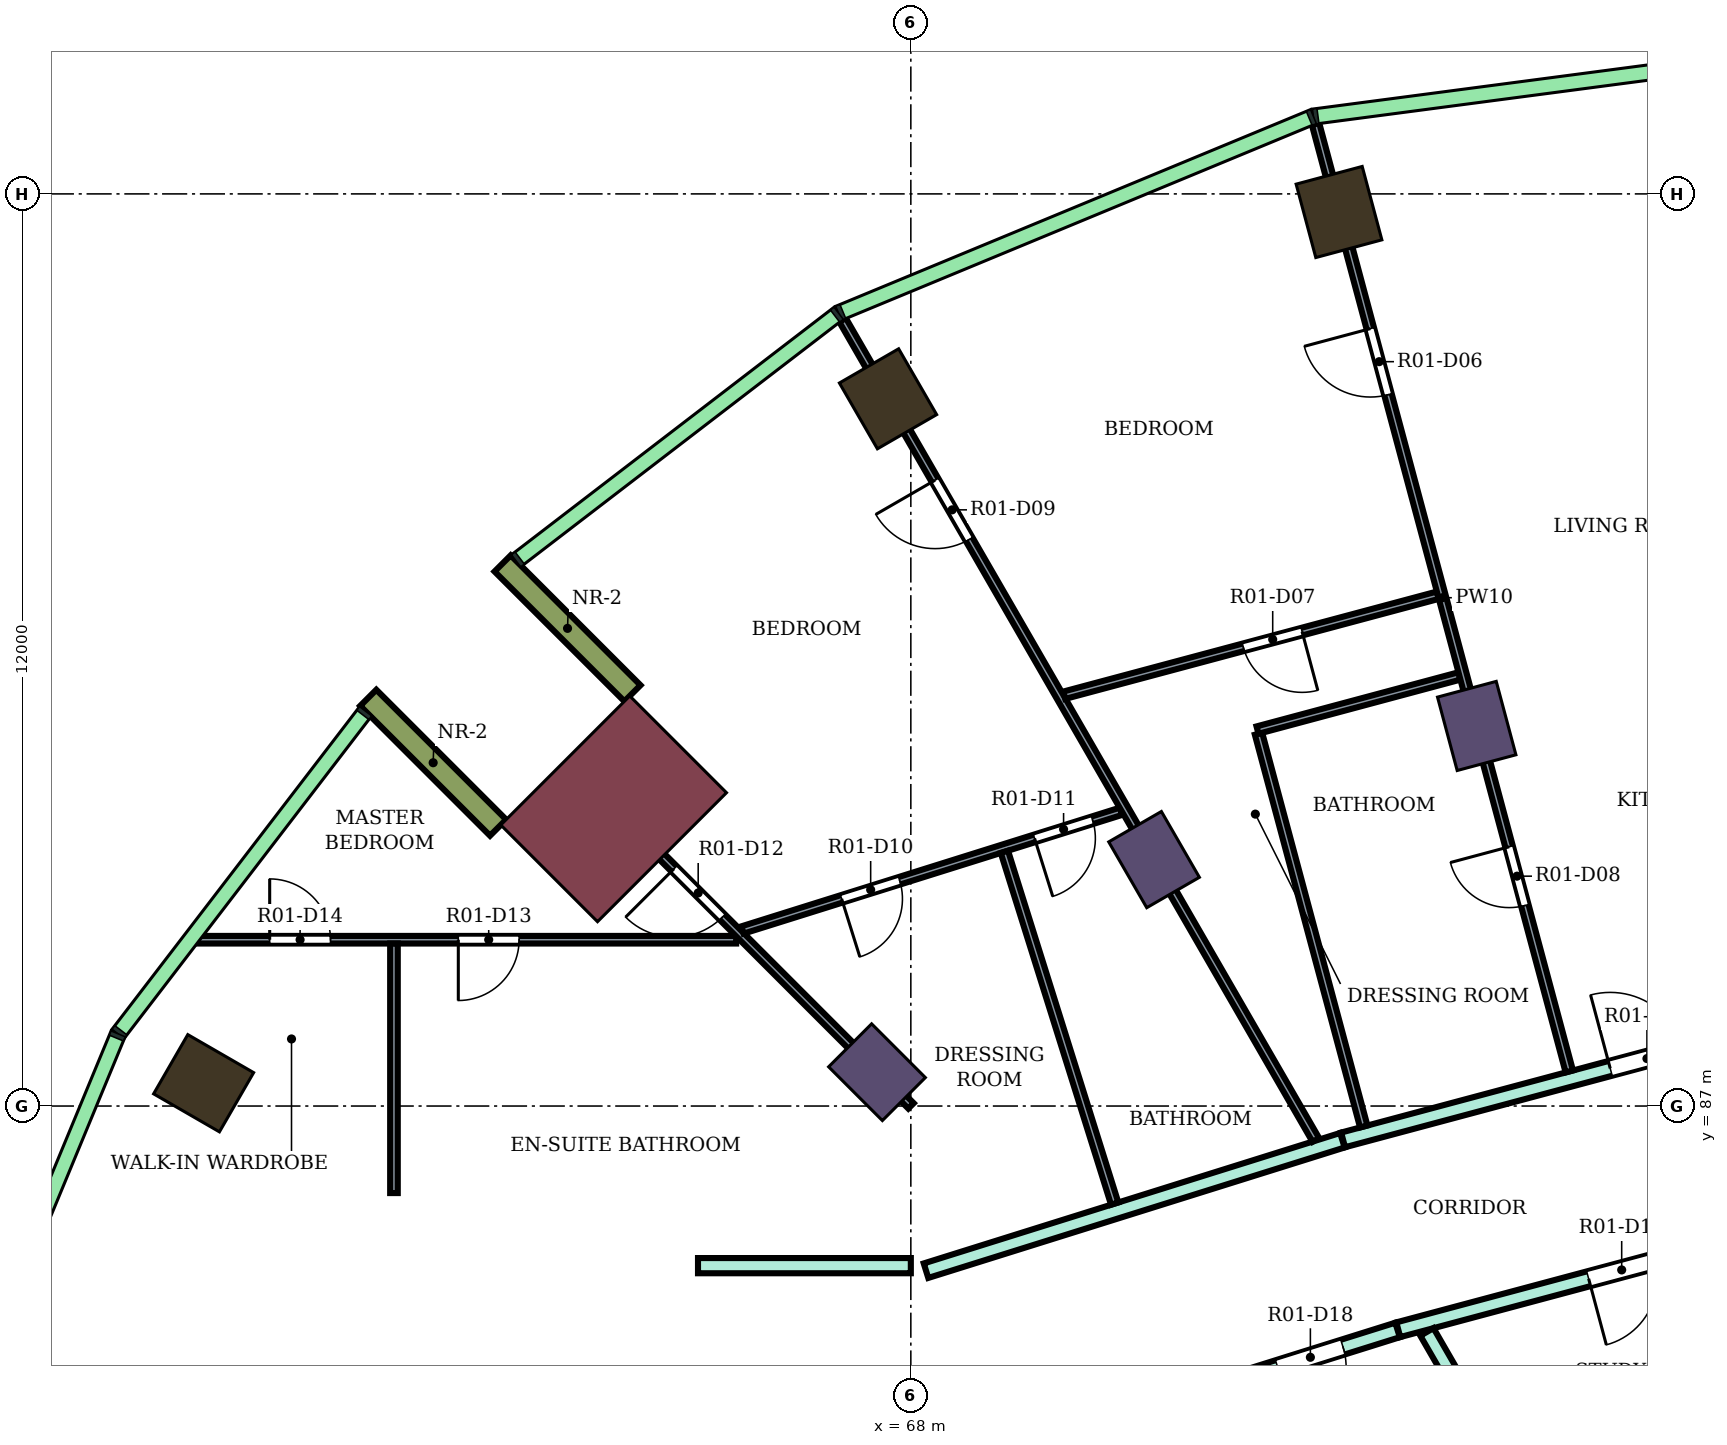
"""IFC4 building model, lengths in metres.
Left out: names, types, materials, properties, quantities, classifications, styles, units other than length and angle.
Written with IfcOpenShell. Run it as: python <this file> out.ifc"""

import sys

from ifc_helpers import new_model, si_unit, direction, frame, frame_2d, origin, origin_2d, place, context, subcontext, project, spatial, rectangle, extrude, element, fill, save


model = new_model("IFC4")
c1 = context("Model", 3, precision=1e-05, world=origin(), true_north=direction((0.0, 1.0)))
c2 = subcontext(c1, "Body", "Model", "MODEL_VIEW")
j1 = project(units=[si_unit("LENGTHUNIT", "METRE"), si_unit("PLANEANGLEUNIT", "RADIAN")], contexts=[c1])
p1 = place(None, origin())
s1 = spatial("IfcSite", under=j1, at=p1, CompositionType="ELEMENT")
p2 = place(p1, origin())
s2 = spatial("IfcBuilding", under=s1, at=p2, CompositionType="ELEMENT")
p3 = place(p2, frame((0.0, 0.0, 157.7)))
s3 = spatial("IfcBuildingStorey", under=s2, at=p3, CompositionType="ELEMENT", Elevation=157.7)
for number, where, z_axis, x_axis in (
    (1, (73.633, 98.762, 0.0), (0.0, 0.0, 1.0), (-0.259, 0.966, 0.0)),
    (2, (67.7, 96.304, 0.0), (0.0, 0.0, 1.0), (-0.5, 0.866, 0.0)),
    (3, (58.696, 87.3, 0.0), (0.0, 0.0, 1.0), (-0.866, 0.5, 0.0)),
):
    element("IfcColumn", number, at=place(p3, frame(where, z_axis=z_axis, x_axis=x_axis)), inside=s3, PredefinedType="COLUMN", context=c2, shape_type="SweptSolid", body=[
        extrude(rectangle(XDim=1.0, YDim=0.9, at=origin_2d()), origin(), (0.0, 0.0, 1.0), 4.1),
    ])
for number, where, z_axis, x_axis in (
    (4, (75.445, 92.0, 0.0), (0.0, 0.0, 1.0), (-0.259, 0.966, 0.0)),
    (5, (71.2, 90.242, 0.0), (0.0, 0.0, 1.0), (-0.5, 0.866, 0.0)),
    (6, (67.555, 87.445, 0.0), (0.0, 0.0, 1.0), (-0.707, 0.707, 0.0)),
):
    element("IfcColumn", number, at=place(p3, frame(where, z_axis=z_axis, x_axis=x_axis)), inside=s3, PredefinedType="COLUMN", context=c2, shape_type="SweptSolid", body=[
        extrude(rectangle(XDim=1.0, YDim=0.8, at=origin_2d()), origin(), (0.0, 0.0, 1.0), 4.1),
    ])
p4 = place(p3, frame((64.09, 90.91, 0.0), z_axis=(0.0, 0.0, 1.0), x_axis=(-0.707106781187, 0.707106781187, 0.0)))
e7 = element("IfcColumn", 7, at=p4, inside=s3, PredefinedType="COLUMN", context=c2, shape_type="SweptSolid", body=[
    extrude(rectangle(XDim=1.8, YDim=2.4, at=origin_2d()), origin(), (0.0, 0.0, 1.0), 4.1),
])
for number, where, z_axis, x_axis in (
    (8, (64.338, 92.43, 0.0), (0.0, 0.0, 1.0), (-0.707, 0.707, 0.0)),
    (9, (62.57, 90.662, 0.0), (0.0, 0.0, 1.0), (-0.707, 0.707, 0.0)),
):
    element("IfcWall", number, at=place(p3, frame(where, z_axis=z_axis, x_axis=x_axis)), inside=s3, PredefinedType="NOTDEFINED", context=c2, shape_type="SweptSolid", body=[
        extrude(rectangle(XDim=2.416, YDim=0.3, at=frame_2d((1.208, 0.0))), origin(), (0.0, 0.0, 1.0), 4.1),
    ])
p5 = place(p3, frame((65.2, 84.9, 0.0), z_axis=(0.0, 0.0, 1.0), x_axis=(1.0, 0.0, 0.0)))
e10 = element("IfcWall", 10, at=p5, inside=s3, PredefinedType="PARTITIONING", context=c2, shape_type="SweptSolid", body=[
    extrude(rectangle(XDim=2.8, YDim=0.2, at=frame_2d((1.4, 0.0))), origin(), (0.0, 0.0, 1.0), 3.65),
])
p6 = place(p3, frame((68.2, 84.834, 0.0), z_axis=(0.0, 0.0, 1.0), x_axis=(0.954272398161, 0.298938438661, 0.0)))
e11 = element("IfcWall", 11, at=p6, inside=s3, PredefinedType="PARTITIONING", context=c2, shape_type="SweptSolid", body=[
    extrude(rectangle(XDim=5.74, YDim=0.2, at=frame_2d((2.87, 0.0))), origin(), (0.0, 0.0, 1.0), 3.65),
])
p7 = place(p3, frame((72.1, 83.332, 0.0), z_axis=(0.0, 0.0, 1.0), x_axis=(0.954233106619, 0.299063836383, 0.0)))
e12 = element("IfcWall", 12, at=p7, inside=s3, PredefinedType="PARTITIONING", context=c2, shape_type="SweptSolid", body=[
    extrude(rectangle(XDim=2.414, YDim=0.2, at=frame_2d((1.207, 0.0))), origin(), (0.0, 0.0, 1.0), 3.65),
])
p8 = place(p7, frame((0.762, 0.0, 0.0)))
e13 = element("IfcOpeningElement", 13, at=p8, cuts=e12, PredefinedType="OPENING", context=c2, shape_type="SweptSolid", body=[
    extrude(rectangle(XDim=0.9, YDim=2.1, at=frame_2d((0.45, 1.05))), frame((0.0, 0.11, 0.0), z_axis=(0.0, -1.0, 0.0), x_axis=(1.0, 0.0, 0.0)), (0.0, 0.0, 1.0), 0.22),
])
p9 = place(p3, frame((73.687, 86.554, 0.0), z_axis=(0.0, 0.0, 1.0), x_axis=(0.965999420828, 0.258544230182, 0.0)))
e14 = element("IfcWall", 14, at=p9, inside=s3, PredefinedType="PARTITIONING", context=c2, shape_type="SweptSolid", body=[
    extrude(rectangle(XDim=6.446, YDim=0.2, at=frame_2d((3.223, 0.0))), origin(), (0.0, 0.0, 1.0), 3.65),
])
p10 = place(p9, frame((3.638, 0.0, 0.0)))
e15 = element("IfcOpeningElement", 15, at=p10, cuts=e14, PredefinedType="OPENING", context=c2, shape_type="SweptSolid", body=[
    extrude(rectangle(XDim=1.0, YDim=2.1, at=frame_2d((0.5, 1.05))), frame((0.0, 0.11, 0.0), z_axis=(0.0, -1.0, 0.0), x_axis=(1.0, 0.0, 0.0)), (0.0, 0.0, 1.0), 0.22),
])
p11 = place(p3, frame((74.413, 84.057, 0.0), z_axis=(0.0, 0.0, 1.0), x_axis=(0.965972135939, 0.258646153246, 0.0)))
e16 = element("IfcWall", 16, at=p11, inside=s3, PredefinedType="PARTITIONING", context=c2, shape_type="SweptSolid", body=[
    extrude(rectangle(XDim=5.654, YDim=0.2, at=frame_2d((2.827, 0.0))), origin(), (0.0, 0.0, 1.0), 3.65),
])
p12 = place(p11, frame((2.593, 0.0, 0.0)))
e17 = element("IfcOpeningElement", 17, at=p12, cuts=e16, PredefinedType="OPENING", context=c2, shape_type="SweptSolid", body=[
    extrude(rectangle(XDim=0.9, YDim=2.1, at=frame_2d((0.45, 1.05))), frame((0.0, 0.11, 0.0), z_axis=(0.0, -1.0, 0.0), x_axis=(1.0, 0.0, 0.0)), (0.0, 0.0, 1.0), 0.22),
])
p13 = place(p3, frame((74.79, 84.028, 0.0), z_axis=(0.0, 0.0, 1.0), x_axis=(0.499905962189, -0.866079689733, 0.0)))
e18 = element("IfcWall", 18, at=p13, inside=s3, PredefinedType="PARTITIONING", context=c2, shape_type="SweptSolid", body=[
    extrude(rectangle(XDim=2.726, YDim=0.2, at=frame_2d((1.363, 0.0))), origin(), (0.0, 0.0, 1.0), 3.65),
])
p14 = place(p3, frame((58.6, 89.188, 0.0), z_axis=(0.0, 0.0, 1.0), x_axis=(1.0, 0.0, 0.0)))
e19 = element("IfcWall", 19, at=p14, inside=s3, PredefinedType="PARTITIONING", context=c2, shape_type="SweptSolid", body=[
    extrude(rectangle(XDim=7.102, YDim=0.1, at=frame_2d((3.551, 0.0))), origin(), (0.0, 0.0, 1.0), 3.65),
])
p15 = place(p14, frame((3.447, 0.0, 0.0)))
e20 = element("IfcOpeningElement", 20, at=p15, cuts=e19, PredefinedType="OPENING", context=c2, shape_type="SweptSolid", body=[
    extrude(rectangle(XDim=0.8, YDim=2.1, at=frame_2d((0.4, 1.05))), frame((0.0, 0.06, 0.0), z_axis=(0.0, -1.0, 0.0), x_axis=(1.0, 0.0, 0.0)), (0.0, 0.0, 1.0), 0.12),
])
p16 = place(p14, frame((0.965, 0.0, 0.0)))
e21 = element("IfcOpeningElement", 21, at=p16, cuts=e19, PredefinedType="OPENING", context=c2, shape_type="SweptSolid", body=[
    extrude(rectangle(XDim=0.8, YDim=2.1, at=frame_2d((0.4, 1.05))), frame((0.0, 0.06, 0.0), z_axis=(0.0, -1.0, 0.0), x_axis=(1.0, 0.0, 0.0)), (0.0, 0.0, 1.0), 0.12),
])
p17 = place(p3, frame((61.2, 85.855, 0.0), z_axis=(0.0, 0.0, 1.0), x_axis=(0.0, 1.0, 0.0)))
e22 = element("IfcWall", 22, at=p17, inside=s3, PredefinedType="PARTITIONING", context=c2, shape_type="SweptSolid", body=[
    extrude(rectangle(XDim=3.283, YDim=0.1, at=frame_2d((1.642, 0.0))), origin(), (0.0, 0.0, 1.0), 3.65),
])
p18 = place(p3, frame((63.598, 91.408, 0.0), z_axis=(0.0, 0.0, 1.0), x_axis=(0.70693039891, -0.707283119477, 0.0)))
e23 = element("IfcWall", 23, at=p18, inside=s3, PredefinedType="PARTITIONING", context=c2, shape_type="SweptSolid", body=[
    extrude(rectangle(XDim=6.229, YDim=0.1, at=frame_2d((3.115, 0.0))), origin(), (0.0, 0.0, 1.0), 3.65),
])
p19 = place(p18, frame((1.819, 0.0, 0.0)))
e24 = element("IfcOpeningElement", 24, at=p19, cuts=e23, PredefinedType="OPENING", context=c2, shape_type="SweptSolid", body=[
    extrude(rectangle(XDim=0.9, YDim=2.1, at=frame_2d((0.45, 1.05))), frame((0.0, 0.06, 0.0), z_axis=(0.0, -1.0, 0.0), x_axis=(1.0, 0.0, 0.0)), (0.0, 0.0, 1.0), 0.12),
])
p20 = place(p3, frame((65.785, 89.316, 0.0), z_axis=(0.0, 0.0, 1.0), x_axis=(0.954187348418, 0.299209799504, 0.0)))
e25 = element("IfcWall", 25, at=p20, inside=s3, PredefinedType="PARTITIONING", context=c2, shape_type="SweptSolid", body=[
    extrude(rectangle(XDim=5.219, YDim=0.1, at=frame_2d((2.609, 0.0))), origin(), (0.0, 0.0, 1.0), 3.65),
])
p21 = place(p20, frame((1.367, 0.0, 0.0)))
e26 = element("IfcOpeningElement", 26, at=p21, cuts=e25, PredefinedType="OPENING", context=c2, shape_type="SweptSolid", body=[
    extrude(rectangle(XDim=0.8, YDim=2.1, at=frame_2d((0.4, 1.05))), frame((0.0, 0.06, 0.0), z_axis=(0.0, -1.0, 0.0), x_axis=(1.0, 0.0, 0.0)), (0.0, 0.0, 1.0), 0.12),
])
p22 = place(p20, frame((4.027, 0.0, 0.0)))
e27 = element("IfcOpeningElement", 27, at=p22, cuts=e25, PredefinedType="OPENING", context=c2, shape_type="SweptSolid", body=[
    extrude(rectangle(XDim=0.8, YDim=2.1, at=frame_2d((0.4, 1.05))), frame((0.0, 0.06, 0.0), z_axis=(0.0, -1.0, 0.0), x_axis=(1.0, 0.0, 0.0)), (0.0, 0.0, 1.0), 0.12),
])
p23 = place(p3, frame((67.101, 97.342, 0.0), z_axis=(0.0, 0.0, 1.0), x_axis=(0.499929451451, -0.866066131177, 0.0)))
e28 = element("IfcWall", 28, at=p23, inside=s3, PredefinedType="PARTITIONING", context=c2, shape_type="SweptSolid", body=[
    extrude(rectangle(XDim=12.456, YDim=0.1, at=frame_2d((6.228, 0.0))), origin(), (0.0, 0.0, 1.0), 3.65),
])
p24 = place(p23, frame((2.434, 0.0, 0.0)))
e29 = element("IfcOpeningElement", 29, at=p24, cuts=e28, PredefinedType="OPENING", context=c2, shape_type="SweptSolid", body=[
    extrude(rectangle(XDim=0.9, YDim=2.1, at=frame_2d((0.45, 1.05))), frame((0.0, 0.06, 0.0), z_axis=(0.0, -1.0, 0.0), x_axis=(1.0, 0.0, 0.0)), (0.0, 0.0, 1.0), 0.12),
])
p25 = place(p3, frame((69.231, 90.344, 0.0), z_axis=(0.0, 0.0, 1.0), x_axis=(0.299203490128, -0.954189326861, 0.0)))
e30 = element("IfcWall", 30, at=p25, inside=s3, PredefinedType="PARTITIONING", context=c2, shape_type="SweptSolid", body=[
    extrude(rectangle(XDim=4.85, YDim=0.1, at=frame_2d((2.425, 0.0))), origin(), (0.0, 0.0, 1.0), 3.65),
])
p26 = place(p3, frame((70.019, 92.405, 0.0), z_axis=(0.0, 0.0, 1.0), x_axis=(0.965982744428, 0.258606530209, 0.0)))
e31 = element("IfcWall", 31, at=p26, inside=s3, PredefinedType="PARTITIONING", context=c2, shape_type="SweptSolid", body=[
    extrude(rectangle(XDim=5.087, YDim=0.1, at=frame_2d((2.543, 0.0))), origin(), (0.0, 0.0, 1.0), 3.65),
])
p27 = place(p26, frame((2.438, 0.0, 0.0)))
e32 = element("IfcOpeningElement", 32, at=p27, cuts=e31, PredefinedType="OPENING", context=c2, shape_type="SweptSolid", body=[
    extrude(rectangle(XDim=0.8, YDim=2.1, at=frame_2d((0.4, 1.05))), frame((0.0, 0.06, 0.0), z_axis=(0.0, -1.0, 0.0), x_axis=(1.0, 0.0, 0.0)), (0.0, 0.0, 1.0), 0.12),
])
p28 = place(p3, frame((72.574, 91.898, 0.0), z_axis=(0.0, 0.0, 1.0), x_axis=(0.258739127054, -0.965947236722, 0.0)))
e33 = element("IfcWall", 33, at=p28, inside=s3, PredefinedType="PARTITIONING", context=c2, shape_type="SweptSolid", body=[
    extrude(rectangle(XDim=5.349, YDim=0.1, at=frame_2d((2.675, 0.0))), origin(), (0.0, 0.0, 1.0), 3.65),
])
p29 = place(p3, frame((72.561, 91.946, 0.0), z_axis=(0.0, 0.0, 1.0), x_axis=(0.96591000446, 0.258878085754, 0.0)))
e34 = element("IfcWall", 34, at=p29, inside=s3, PredefinedType="PARTITIONING", context=c2, shape_type="SweptSolid", body=[
    extrude(rectangle(XDim=2.75, YDim=0.1, at=frame_2d((1.375, 0.0))), origin(), (0.0, 0.0, 1.0), 3.65),
])
p30 = place(p3, frame((73.324, 99.92, 0.0), z_axis=(0.0, 0.0, 1.0), x_axis=(0.258710550884, -0.965954890697, 0.0)))
e35 = element("IfcWall", 35, at=p30, inside=s3, PredefinedType="PARTITIONING", context=c2, shape_type="SweptSolid", body=[
    extrude(rectangle(XDim=12.904, YDim=0.1, at=frame_2d((6.452, 0.0))), origin(), (0.0, 0.0, 1.0), 3.65),
])
p31 = place(p30, frame((2.787, 0.0, 0.0)))
e36 = element("IfcOpeningElement", 36, at=p31, cuts=e35, PredefinedType="OPENING", context=c2, shape_type="SweptSolid", body=[
    extrude(rectangle(XDim=0.9, YDim=2.1, at=frame_2d((0.45, 1.05))), frame((0.0, 0.06, 0.0), z_axis=(0.0, -1.0, 0.0), x_axis=(1.0, 0.0, 0.0)), (0.0, 0.0, 1.0), 0.12),
])
p32 = place(p30, frame((9.844, 0.0, 0.0)))
e37 = element("IfcOpeningElement", 37, at=p32, cuts=e35, PredefinedType="OPENING", context=c2, shape_type="SweptSolid", body=[
    extrude(rectangle(XDim=0.8, YDim=2.1, at=frame_2d((0.4, 1.05))), frame((0.0, 0.06, 0.0), z_axis=(0.0, -1.0, 0.0), x_axis=(1.0, 0.0, 0.0)), (0.0, 0.0, 1.0), 0.12),
])
p33 = place(p10, origin())
e38 = element("IfcDoor", 38, at=p33, inside=s3, OperationType="SINGLE_SWING_LEFT", PredefinedType="DOOR", context=c2, shape_type="SweptSolid", body=[
    extrude(rectangle(XDim=1.0, YDim=2.1, at=frame_2d((0.5, 1.05))), frame((0.0, 0.025, 0.0), z_axis=(0.0, -1.0, 0.0), x_axis=(1.0, 0.0, 0.0)), (0.0, 0.0, 1.0), 0.05),
])
fill(e15, e38)
p34 = place(p31, frame((0.9, 0.0, 0.0), z_axis=(0.0, 0.0, 1.0), x_axis=(-1.0, 0.0, 0.0)))
e39 = element("IfcDoor", 39, at=p34, inside=s3, OperationType="SINGLE_SWING_RIGHT", PredefinedType="DOOR", context=c2, shape_type="SweptSolid", body=[
    extrude(rectangle(XDim=0.9, YDim=2.1, at=frame_2d((0.45, 1.05))), frame((0.0, 0.025, 0.0), z_axis=(0.0, -1.0, 0.0), x_axis=(1.0, 0.0, 0.0)), (0.0, 0.0, 1.0), 0.05),
])
fill(e36, e39)
p35 = place(p27, frame((0.8, 0.0, 0.0), z_axis=(0.0, 0.0, 1.0), x_axis=(-1.0, 0.0, 0.0)))
e40 = element("IfcDoor", 40, at=p35, inside=s3, OperationType="SINGLE_SWING_LEFT", PredefinedType="DOOR", context=c2, shape_type="SweptSolid", body=[
    extrude(rectangle(XDim=0.8, YDim=2.1, at=frame_2d((0.4, 1.05))), frame((0.0, 0.025, 0.0), z_axis=(0.0, -1.0, 0.0), x_axis=(1.0, 0.0, 0.0)), (0.0, 0.0, 1.0), 0.05),
])
fill(e32, e40)
p36 = place(p32, frame((0.8, 0.0, 0.0), z_axis=(0.0, 0.0, 1.0), x_axis=(-1.0, 0.0, 0.0)))
e41 = element("IfcDoor", 41, at=p36, inside=s3, OperationType="SINGLE_SWING_RIGHT", PredefinedType="DOOR", context=c2, shape_type="SweptSolid", body=[
    extrude(rectangle(XDim=0.8, YDim=2.1, at=frame_2d((0.4, 1.05))), frame((0.0, 0.025, 0.0), z_axis=(0.0, -1.0, 0.0), x_axis=(1.0, 0.0, 0.0)), (0.0, 0.0, 1.0), 0.05),
])
fill(e37, e41)
p37 = place(p24, frame((0.9, 0.0, 0.0), z_axis=(0.0, 0.0, 1.0), x_axis=(-1.0, 0.0, 0.0)))
e42 = element("IfcDoor", 42, at=p37, inside=s3, OperationType="SINGLE_SWING_RIGHT", PredefinedType="DOOR", context=c2, shape_type="SweptSolid", body=[
    extrude(rectangle(XDim=0.9, YDim=2.1, at=frame_2d((0.45, 1.05))), frame((0.0, 0.025, 0.0), z_axis=(0.0, -1.0, 0.0), x_axis=(1.0, 0.0, 0.0)), (0.0, 0.0, 1.0), 0.05),
])
fill(e29, e42)
p38 = place(p21, frame((0.8, 0.0, 0.0), z_axis=(0.0, 0.0, 1.0), x_axis=(-1.0, 0.0, 0.0)))
e43 = element("IfcDoor", 43, at=p38, inside=s3, OperationType="SINGLE_SWING_RIGHT", PredefinedType="DOOR", context=c2, shape_type="SweptSolid", body=[
    extrude(rectangle(XDim=0.8, YDim=2.1, at=frame_2d((0.4, 1.05))), frame((0.0, 0.025, 0.0), z_axis=(0.0, -1.0, 0.0), x_axis=(1.0, 0.0, 0.0)), (0.0, 0.0, 1.0), 0.05),
])
fill(e26, e43)
p39 = place(p22, frame((0.8, 0.0, 0.0), z_axis=(0.0, 0.0, 1.0), x_axis=(-1.0, 0.0, 0.0)))
e44 = element("IfcDoor", 44, at=p39, inside=s3, OperationType="SINGLE_SWING_RIGHT", PredefinedType="DOOR", context=c2, shape_type="SweptSolid", body=[
    extrude(rectangle(XDim=0.8, YDim=2.1, at=frame_2d((0.4, 1.05))), frame((0.0, 0.025, 0.0), z_axis=(0.0, -1.0, 0.0), x_axis=(1.0, 0.0, 0.0)), (0.0, 0.0, 1.0), 0.05),
])
fill(e27, e44)
p40 = place(p19, frame((0.9, 0.0, 0.0), z_axis=(0.0, 0.0, 1.0), x_axis=(-1.0, 0.0, 0.0)))
e45 = element("IfcDoor", 45, at=p40, inside=s3, OperationType="SINGLE_SWING_RIGHT", PredefinedType="DOOR", context=c2, shape_type="SweptSolid", body=[
    extrude(rectangle(XDim=0.9, YDim=2.1, at=frame_2d((0.45, 1.05))), frame((0.0, 0.025, 0.0), z_axis=(0.0, -1.0, 0.0), x_axis=(1.0, 0.0, 0.0)), (0.0, 0.0, 1.0), 0.05),
])
fill(e24, e45)
p41 = place(p15, frame((0.8, 0.0, 0.0), z_axis=(0.0, 0.0, 1.0), x_axis=(-1.0, 0.0, 0.0)))
e46 = element("IfcDoor", 46, at=p41, inside=s3, OperationType="SINGLE_SWING_RIGHT", PredefinedType="DOOR", context=c2, shape_type="SweptSolid", body=[
    extrude(rectangle(XDim=0.8, YDim=2.1, at=frame_2d((0.4, 1.05))), frame((0.0, 0.025, 0.0), z_axis=(0.0, -1.0, 0.0), x_axis=(1.0, 0.0, 0.0)), (0.0, 0.0, 1.0), 0.05),
])
fill(e20, e46)
p42 = place(p16, origin())
e47 = element("IfcDoor", 47, at=p42, inside=s3, OperationType="SINGLE_SWING_LEFT", PredefinedType="DOOR", context=c2, shape_type="SweptSolid", body=[
    extrude(rectangle(XDim=0.8, YDim=2.1, at=frame_2d((0.4, 1.05))), frame((0.0, 0.025, 0.0), z_axis=(0.0, -1.0, 0.0), x_axis=(1.0, 0.0, 0.0)), (0.0, 0.0, 1.0), 0.05),
])
fill(e21, e47)
p43 = place(p12, frame((0.9, 0.0, 0.0), z_axis=(0.0, 0.0, 1.0), x_axis=(-1.0, 0.0, 0.0)))
e48 = element("IfcDoor", 48, at=p43, inside=s3, OperationType="SINGLE_SWING_RIGHT", PredefinedType="DOOR", context=c2, shape_type="SweptSolid", body=[
    extrude(rectangle(XDim=0.9, YDim=2.1, at=frame_2d((0.45, 1.05))), frame((0.0, 0.025, 0.0), z_axis=(0.0, -1.0, 0.0), x_axis=(1.0, 0.0, 0.0)), (0.0, 0.0, 1.0), 0.05),
])
fill(e17, e48)
p44 = place(p8, frame((0.9, 0.0, 0.0), z_axis=(0.0, 0.0, 1.0), x_axis=(-1.0, 0.0, 0.0)))
e49 = element("IfcDoor", 49, at=p44, inside=s3, OperationType="SINGLE_SWING_RIGHT", PredefinedType="DOOR", context=c2, shape_type="SweptSolid", body=[
    extrude(rectangle(XDim=0.9, YDim=2.1, at=frame_2d((0.45, 1.05))), frame((0.0, 0.025, 0.0), z_axis=(0.0, -1.0, 0.0), x_axis=(1.0, 0.0, 0.0)), (0.0, 0.0, 1.0), 0.05),
])
fill(e13, e49)
save(model, sys.argv[1])
